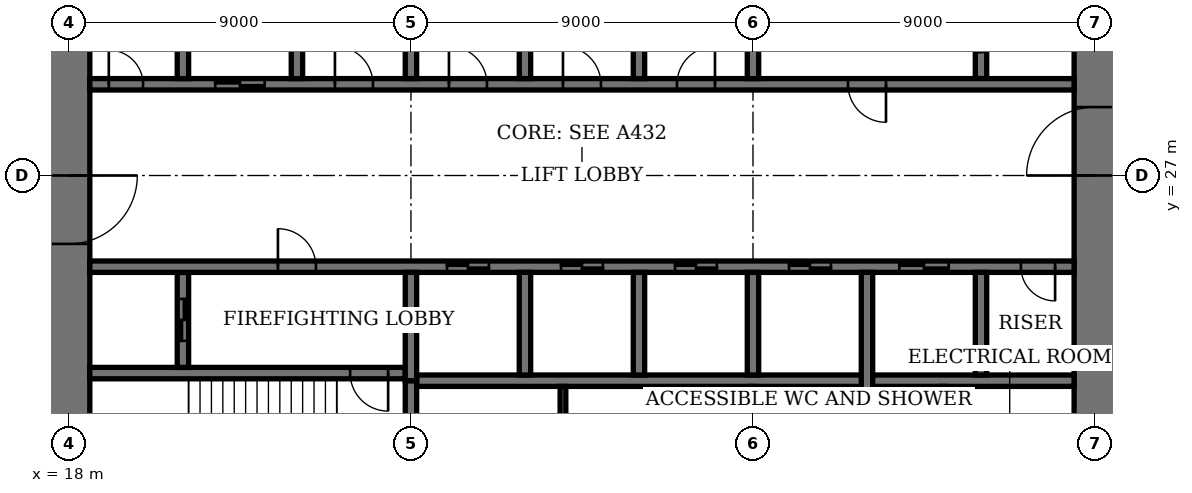
"""IFC4 building model, lengths in metres.
Left out: names, types, materials, properties, quantities, classifications, styles, units other than length and angle.
Written with IfcOpenShell. Run it as: python <this file> out.ifc"""

import sys

from ifc_helpers import new_model, si_unit, direction, frame, frame_2d, origin, place, context, subcontext, project, spatial, rectangle, extrude, element, fill, save


model = new_model("IFC4")
c1 = context("Model", 3, precision=1e-05, world=origin(), true_north=direction((0.0, 1.0)))
c2 = subcontext(c1, "Body", "Model", "MODEL_VIEW")
j1 = project(units=[si_unit("LENGTHUNIT", "METRE"), si_unit("PLANEANGLEUNIT", "RADIAN")], contexts=[c1])
p1 = place(None, origin())
s1 = spatial("IfcSite", under=j1, at=p1, CompositionType="ELEMENT")
p2 = place(p1, origin())
s2 = spatial("IfcBuilding", under=s1, at=p2, CompositionType="ELEMENT")
p3 = place(p2, frame((0.0, 0.0, 291.4)))
s3 = spatial("IfcBuildingStorey", under=s2, at=p3, CompositionType="ELEMENT", Elevation=291.4)
p4 = place(p3, frame((18.0, 35.45, 0.0), z_axis=(0.0, 0.0, 1.0), x_axis=(0.0, -1.0, 0.0)))
e1 = element("IfcWall", 1, at=p4, inside=s3, PredefinedType="SHEAR", context=c2, shape_type="SweptSolid", body=[
    extrude(rectangle(XDim=16.9, YDim=1.1, at=frame_2d((8.45, 0.0))), origin(), (0.0, 0.0, 1.0), 4.0),
])
p5 = place(p4, frame((8.45, 0.0, 0.0)))
e2 = element("IfcOpeningElement", 2, at=p5, cuts=e1, PredefinedType="OPENING", context=c2, shape_type="SweptSolid", body=[
    extrude(rectangle(XDim=1.8, YDim=2.4, at=frame_2d((0.9, 1.2))), frame((0.0, 0.56, 0.0), z_axis=(0.0, -1.0, 0.0), x_axis=(1.0, 0.0, 0.0)), (0.0, 0.0, 1.0), 1.12),
])
p6 = place(p3, frame((45.0, 18.55, 0.0), z_axis=(0.0, 0.0, 1.0), x_axis=(0.0, 1.0, 0.0)))
e3 = element("IfcWall", 3, at=p6, inside=s3, PredefinedType="SHEAR", context=c2, shape_type="SweptSolid", body=[
    extrude(rectangle(XDim=16.9, YDim=1.1, at=frame_2d((8.45, 0.0))), origin(), (0.0, 0.0, 1.0), 4.0),
])
p7 = place(p6, frame((8.45, 0.0, 0.0)))
e4 = element("IfcOpeningElement", 4, at=p7, cuts=e3, PredefinedType="OPENING", context=c2, shape_type="SweptSolid", body=[
    extrude(rectangle(XDim=1.8, YDim=2.4, at=frame_2d((0.9, 1.2))), frame((0.0, 0.56, 0.0), z_axis=(0.0, -1.0, 0.0), x_axis=(1.0, 0.0, 0.0)), (0.0, 0.0, 1.0), 1.12),
])
p8 = place(p3, frame((18.55, 21.8, 0.0), z_axis=(0.0, 0.0, 1.0), x_axis=(1.0, 0.0, 0.0)))
e5 = element("IfcWall", 5, at=p8, inside=s3, PredefinedType="SHEAR", context=c2, shape_type="SweptSolid", body=[
    extrude(rectangle(XDim=8.3, YDim=0.3, at=frame_2d((4.15, 0.0))), origin(), (0.0, 0.0, 1.0), 4.0),
])
p9 = place(p8, frame((6.85, 0.0, 0.0)))
e6 = element("IfcOpeningElement", 6, at=p9, cuts=e5, PredefinedType="OPENING", context=c2, shape_type="SweptSolid", body=[
    extrude(rectangle(XDim=1.0, YDim=2.4, at=frame_2d((0.5, 1.2))), frame((0.0, 0.16, 0.0), z_axis=(0.0, -1.0, 0.0), x_axis=(1.0, 0.0, 0.0)), (0.0, 0.0, 1.0), 0.32),
])
p10 = place(p3, frame((27.0, 18.55, 0.0), z_axis=(0.0, 0.0, 1.0), x_axis=(0.0, 1.0, 0.0)))
e7 = element("IfcWall", 7, at=p10, inside=s3, PredefinedType="SHEAR", context=c2, shape_type="SweptSolid", body=[
    extrude(rectangle(XDim=3.05, YDim=0.3, at=frame_2d((1.525, 0.0))), origin(), (0.0, 0.0, 1.0), 4.0),
])
p11 = place(p3, frame((21.0, 21.95, 0.0), z_axis=(0.0, 0.0, 1.0), x_axis=(0.0, 1.0, 0.0)))
e8 = element("IfcWall", 8, at=p11, inside=s3, PredefinedType="SHEAR", context=c2, shape_type="SweptSolid", body=[
    extrude(rectangle(XDim=2.5, YDim=0.3, at=frame_2d((1.25, 0.0))), origin(), (0.0, 0.0, 1.0), 4.0),
])
p12 = place(p11, frame((0.7, 0.0, 0.0)))
e9 = element("IfcOpeningElement", 9, at=p12, cuts=e8, PredefinedType="OPENING", context=c2, shape_type="SweptSolid", body=[
    extrude(rectangle(XDim=1.1, YDim=2.4, at=frame_2d((0.55, 1.2))), frame((0.0, 0.16, 0.0), z_axis=(0.0, -1.0, 0.0), x_axis=(1.0, 0.0, 0.0)), (0.0, 0.0, 1.0), 0.32),
])
p13 = place(p3, frame((42.0, 29.55, 0.0), z_axis=(0.0, 0.0, 1.0), x_axis=(0.0, 1.0, 0.0)))
e10 = element("IfcWall", 10, at=p13, inside=s3, PredefinedType="SHEAR", context=c2, shape_type="SweptSolid", body=[
    extrude(rectangle(XDim=2.5, YDim=0.3, at=frame_2d((1.25, 0.0))), origin(), (0.0, 0.0, 1.0), 4.0),
])
p14 = place(p13, frame((0.7, 0.0, 0.0)))
e11 = element("IfcOpeningElement", 11, at=p14, cuts=e10, PredefinedType="OPENING", context=c2, shape_type="SweptSolid", body=[
    extrude(rectangle(XDim=1.1, YDim=2.4, at=frame_2d((0.55, 1.2))), frame((0.0, 0.16, 0.0), z_axis=(0.0, -1.0, 0.0), x_axis=(1.0, 0.0, 0.0)), (0.0, 0.0, 1.0), 0.32),
])
p15 = place(p3, frame((18.55, 24.6, 0.0), z_axis=(0.0, 0.0, 1.0), x_axis=(1.0, 0.0, 0.0)))
e12 = element("IfcWall", 12, at=p15, inside=s3, PredefinedType="SHEAR", context=c2, shape_type="SweptSolid", body=[
    extrude(rectangle(XDim=25.9, YDim=0.3, at=frame_2d((12.95, 0.0))), origin(), (0.0, 0.0, 1.0), 4.0),
])
p16 = place(p15, frame((4.95, 0.0, 0.0)))
e13 = element("IfcOpeningElement", 13, at=p16, cuts=e12, PredefinedType="OPENING", context=c2, shape_type="SweptSolid", body=[
    extrude(rectangle(XDim=1.0, YDim=2.4, at=frame_2d((0.5, 1.2))), frame((0.0, 0.16, 0.0), z_axis=(0.0, -1.0, 0.0), x_axis=(1.0, 0.0, 0.0)), (0.0, 0.0, 1.0), 0.32),
])
p17 = place(p15, frame((24.5, 0.0, 0.0)))
e14 = element("IfcOpeningElement", 14, at=p17, cuts=e12, PredefinedType="OPENING", context=c2, shape_type="SweptSolid", body=[
    extrude(rectangle(XDim=0.9, YDim=2.1, at=frame_2d((0.45, 1.05))), frame((0.0, 0.16, 0.0), z_axis=(0.0, -1.0, 0.0), x_axis=(1.0, 0.0, 0.0)), (0.0, 0.0, 1.0), 0.32),
])
p18 = place(p15, frame((9.4, 0.0, 0.0)))
e15 = element("IfcOpeningElement", 15, at=p18, cuts=e12, PredefinedType="OPENING", context=c2, shape_type="SweptSolid", body=[
    extrude(rectangle(XDim=1.1, YDim=2.4, at=frame_2d((0.55, 1.2))), frame((0.0, 0.16, 0.0), z_axis=(0.0, -1.0, 0.0), x_axis=(1.0, 0.0, 0.0)), (0.0, 0.0, 1.0), 0.32),
])
p19 = place(p15, frame((12.4, 0.0, 0.0)))
e16 = element("IfcOpeningElement", 16, at=p19, cuts=e12, PredefinedType="OPENING", context=c2, shape_type="SweptSolid", body=[
    extrude(rectangle(XDim=1.1, YDim=2.4, at=frame_2d((0.55, 1.2))), frame((0.0, 0.16, 0.0), z_axis=(0.0, -1.0, 0.0), x_axis=(1.0, 0.0, 0.0)), (0.0, 0.0, 1.0), 0.32),
])
p20 = place(p15, frame((15.4, 0.0, 0.0)))
e17 = element("IfcOpeningElement", 17, at=p20, cuts=e12, PredefinedType="OPENING", context=c2, shape_type="SweptSolid", body=[
    extrude(rectangle(XDim=1.1, YDim=2.4, at=frame_2d((0.55, 1.2))), frame((0.0, 0.16, 0.0), z_axis=(0.0, -1.0, 0.0), x_axis=(1.0, 0.0, 0.0)), (0.0, 0.0, 1.0), 0.32),
])
p21 = place(p15, frame((18.4, 0.0, 0.0)))
e18 = element("IfcOpeningElement", 18, at=p21, cuts=e12, PredefinedType="OPENING", context=c2, shape_type="SweptSolid", body=[
    extrude(rectangle(XDim=1.1, YDim=2.4, at=frame_2d((0.55, 1.2))), frame((0.0, 0.16, 0.0), z_axis=(0.0, -1.0, 0.0), x_axis=(1.0, 0.0, 0.0)), (0.0, 0.0, 1.0), 0.32),
])
p22 = place(p15, frame((21.3, 0.0, 0.0)))
e19 = element("IfcOpeningElement", 19, at=p22, cuts=e12, PredefinedType="OPENING", context=c2, shape_type="SweptSolid", body=[
    extrude(rectangle(XDim=1.3, YDim=2.4, at=frame_2d((0.65, 1.2))), frame((0.0, 0.16, 0.0), z_axis=(0.0, -1.0, 0.0), x_axis=(1.0, 0.0, 0.0)), (0.0, 0.0, 1.0), 0.32),
])
p23 = place(p3, frame((18.55, 29.4, 0.0), z_axis=(0.0, 0.0, 1.0), x_axis=(1.0, 0.0, 0.0)))
e20 = element("IfcWall", 20, at=p23, inside=s3, PredefinedType="SHEAR", context=c2, shape_type="SweptSolid", body=[
    extrude(rectangle(XDim=25.9, YDim=0.3, at=frame_2d((12.95, 0.0))), origin(), (0.0, 0.0, 1.0), 4.0),
])
p24 = place(p23, frame((19.95, 0.0, 0.0)))
e21 = element("IfcOpeningElement", 21, at=p24, cuts=e20, PredefinedType="OPENING", context=c2, shape_type="SweptSolid", body=[
    extrude(rectangle(XDim=1.0, YDim=2.4, at=frame_2d((0.5, 1.2))), frame((0.0, 0.16, 0.0), z_axis=(0.0, -1.0, 0.0), x_axis=(1.0, 0.0, 0.0)), (0.0, 0.0, 1.0), 0.32),
])
p25 = place(p23, frame((0.5, 0.0, 0.0)))
e22 = element("IfcOpeningElement", 22, at=p25, cuts=e20, PredefinedType="OPENING", context=c2, shape_type="SweptSolid", body=[
    extrude(rectangle(XDim=0.9, YDim=2.1, at=frame_2d((0.45, 1.05))), frame((0.0, 0.16, 0.0), z_axis=(0.0, -1.0, 0.0), x_axis=(1.0, 0.0, 0.0)), (0.0, 0.0, 1.0), 0.32),
])
p26 = place(p23, frame((15.45, 0.0, 0.0)))
e23 = element("IfcOpeningElement", 23, at=p26, cuts=e20, PredefinedType="OPENING", context=c2, shape_type="SweptSolid", body=[
    extrude(rectangle(XDim=1.0, YDim=2.4, at=frame_2d((0.5, 1.2))), frame((0.0, 0.16, 0.0), z_axis=(0.0, -1.0, 0.0), x_axis=(1.0, 0.0, 0.0)), (0.0, 0.0, 1.0), 0.32),
])
p27 = place(p23, frame((12.45, 0.0, 0.0)))
e24 = element("IfcOpeningElement", 24, at=p27, cuts=e20, PredefinedType="OPENING", context=c2, shape_type="SweptSolid", body=[
    extrude(rectangle(XDim=1.0, YDim=2.4, at=frame_2d((0.5, 1.2))), frame((0.0, 0.16, 0.0), z_axis=(0.0, -1.0, 0.0), x_axis=(1.0, 0.0, 0.0)), (0.0, 0.0, 1.0), 0.32),
])
p28 = place(p23, frame((9.45, 0.0, 0.0)))
e25 = element("IfcOpeningElement", 25, at=p28, cuts=e20, PredefinedType="OPENING", context=c2, shape_type="SweptSolid", body=[
    extrude(rectangle(XDim=1.0, YDim=2.4, at=frame_2d((0.5, 1.2))), frame((0.0, 0.16, 0.0), z_axis=(0.0, -1.0, 0.0), x_axis=(1.0, 0.0, 0.0)), (0.0, 0.0, 1.0), 0.32),
])
p29 = place(p23, frame((6.45, 0.0, 0.0)))
e26 = element("IfcOpeningElement", 26, at=p29, cuts=e20, PredefinedType="OPENING", context=c2, shape_type="SweptSolid", body=[
    extrude(rectangle(XDim=1.0, YDim=2.4, at=frame_2d((0.5, 1.2))), frame((0.0, 0.16, 0.0), z_axis=(0.0, -1.0, 0.0), x_axis=(1.0, 0.0, 0.0)), (0.0, 0.0, 1.0), 0.32),
])
p30 = place(p23, frame((3.3, 0.0, 0.0)))
e27 = element("IfcOpeningElement", 27, at=p30, cuts=e20, PredefinedType="OPENING", context=c2, shape_type="SweptSolid", body=[
    extrude(rectangle(XDim=1.3, YDim=2.4, at=frame_2d((0.65, 1.2))), frame((0.0, 0.16, 0.0), z_axis=(0.0, -1.0, 0.0), x_axis=(1.0, 0.0, 0.0)), (0.0, 0.0, 1.0), 0.32),
])
p31 = place(p3, frame((27.15, 21.6, 0.0), z_axis=(0.0, 0.0, 1.0), x_axis=(1.0, 0.0, 0.0)))
e28 = element("IfcWall", 28, at=p31, inside=s3, PredefinedType="SHEAR", context=c2, shape_type="SweptSolid", body=[
    extrude(rectangle(XDim=17.3, YDim=0.3, at=frame_2d((8.65, 0.0))), origin(), (0.0, 0.0, 1.0), 4.0),
])
for number, where, z_axis, x_axis in (
    (29, (30.0, 21.75, 0.0), (0.0, 0.0, 1.0), (0.0, 1.0, 0.0)),
    (30, (33.0, 29.55, 0.0), (0.0, 0.0, 1.0), (0.0, 1.0, 0.0)),
    (31, (33.0, 21.75, 0.0), (0.0, 0.0, 1.0), (0.0, 1.0, 0.0)),
    (32, (30.0, 29.55, 0.0), (0.0, 0.0, 1.0), (0.0, 1.0, 0.0)),
    (33, (36.0, 21.75, 0.0), (0.0, 0.0, 1.0), (0.0, 1.0, 0.0)),
    (34, (27.0, 29.55, 0.0), (0.0, 0.0, 1.0), (0.0, 1.0, 0.0)),
):
    element("IfcWall", number, at=place(p3, frame(where, z_axis=z_axis, x_axis=x_axis)), inside=s3, PredefinedType="SHEAR", context=c2, shape_type="SweptSolid", body=[
        extrude(rectangle(XDim=2.7, YDim=0.3, at=frame_2d((1.35, 0.0))), origin(), (0.0, 0.0, 1.0), 4.0),
    ])
for number, where, z_axis, x_axis in (
    (35, (39.0, 18.55, 0.0), (0.0, 0.0, 1.0), (0.0, 1.0, 0.0)),
    (36, (24.0, 29.55, 0.0), (0.0, 0.0, 1.0), (0.0, 1.0, 0.0)),
):
    element("IfcWall", number, at=place(p3, frame(where, z_axis=z_axis, x_axis=x_axis)), inside=s3, PredefinedType="SHEAR", context=c2, shape_type="SweptSolid", body=[
        extrude(rectangle(XDim=5.9, YDim=0.3, at=frame_2d((2.95, 0.0))), origin(), (0.0, 0.0, 1.0), 4.0),
    ])
for number, where, z_axis, x_axis in (
    (37, (42.0, 21.75, 0.0), (0.0, 0.0, 1.0), (0.0, 1.0, 0.0)),
    (38, (21.0, 29.55, 0.0), (0.0, 0.0, 1.0), (0.0, 1.0, 0.0)),
):
    element("IfcWall", number, at=place(p3, frame(where, z_axis=z_axis, x_axis=x_axis)), inside=s3, PredefinedType="SHEAR", context=c2, shape_type="SweptSolid", body=[
        extrude(rectangle(XDim=2.7, YDim=0.3, at=frame_2d((1.35, 0.0))), origin(), (0.0, 0.0, 1.0), 4.0),
    ])
for number, where, z_axis, x_axis in (
    (39, (27.0, 21.6, 0.0), (0.0, 0.0, 1.0), (0.0, 1.0, 0.0)),
    (40, (36.0, 29.55, 0.0), (0.0, 0.0, 1.0), (0.0, 1.0, 0.0)),
):
    element("IfcWall", number, at=place(p3, frame(where, z_axis=z_axis, x_axis=x_axis)), inside=s3, PredefinedType="SHEAR", context=c2, shape_type="SweptSolid", body=[
        extrude(rectangle(XDim=2.85, YDim=0.3, at=frame_2d((1.425, 0.0))), origin(), (0.0, 0.0, 1.0), 4.0),
    ])
for number, where, z_axis, x_axis in (
    (41, (31.0, 18.55, 0.0), (0.0, 0.0, 1.0), (0.0, 1.0, 0.0)),
    (42, (36.0, 18.55, 0.0), (0.0, 0.0, 1.0), (0.0, 1.0, 0.0)),
):
    element("IfcWall", number, at=place(p3, frame(where, z_axis=z_axis, x_axis=x_axis)), inside=s3, PredefinedType="PARTITIONING", context=c2, shape_type="SweptSolid", body=[
        extrude(rectangle(XDim=2.9, YDim=0.15, at=frame_2d((1.45, 0.0))), origin(), (0.0, 0.0, 1.0), 3.75),
    ])
p32 = place(p3, frame((41.0, 18.55, 0.0), z_axis=(0.0, 0.0, 1.0), x_axis=(0.0, 1.0, 0.0)))
e43 = element("IfcWall", 43, at=p32, inside=s3, PredefinedType="PARTITIONING", context=c2, shape_type="SweptSolid", body=[
    extrude(rectangle(XDim=2.9, YDim=0.12, at=frame_2d((1.45, 0.0))), origin(), (0.0, 0.0, 1.0), 3.75),
])
p33 = place(p32, frame((0.95, 0.0, 0.0)))
e44 = element("IfcOpeningElement", 44, at=p33, cuts=e43, PredefinedType="OPENING", context=c2, shape_type="SweptSolid", body=[
    extrude(rectangle(XDim=1.0, YDim=2.4, at=frame_2d((0.5, 1.2))), frame((0.0, 0.07, 0.0), z_axis=(0.0, -1.0, 0.0), x_axis=(1.0, 0.0, 0.0)), (0.0, 0.0, 1.0), 0.14),
])
p34 = place(p5, origin())
e45 = element("IfcDoor", 45, at=p34, inside=s3, OperationType="DOUBLE_DOOR_DOUBLE_SWING", PredefinedType="DOOR", context=c2, shape_type="SweptSolid", body=[
    extrude(rectangle(XDim=1.8, YDim=2.4, at=frame_2d((0.9, 1.2))), frame((0.0, 0.03, 0.0), z_axis=(0.0, -1.0, 0.0), x_axis=(1.0, 0.0, 0.0)), (0.0, 0.0, 1.0), 0.06),
    extrude(rectangle(XDim=0.04, YDim=2.4, at=frame_2d((0.02, 1.2))), frame((0.0, 0.55, 0.0), z_axis=(0.0, -1.0, 0.0), x_axis=(1.0, 0.0, 0.0)), (0.0, 0.0, 1.0), 1.1),
    extrude(rectangle(XDim=0.04, YDim=2.4, at=frame_2d((1.78, 1.2))), frame((0.0, 0.55, 0.0), z_axis=(0.0, -1.0, 0.0), x_axis=(1.0, 0.0, 0.0)), (0.0, 0.0, 1.0), 1.1),
    extrude(rectangle(XDim=1.8, YDim=0.04, at=frame_2d((0.9, 2.38))), frame((0.0, 0.55, 0.0), z_axis=(0.0, -1.0, 0.0), x_axis=(1.0, 0.0, 0.0)), (0.0, 0.0, 1.0), 1.1),
])
fill(e2, e45)
p35 = place(p7, origin())
e46 = element("IfcDoor", 46, at=p35, inside=s3, OperationType="DOUBLE_DOOR_DOUBLE_SWING", PredefinedType="DOOR", context=c2, shape_type="SweptSolid", body=[
    extrude(rectangle(XDim=1.8, YDim=2.4, at=frame_2d((0.9, 1.2))), frame((0.0, 0.03, 0.0), z_axis=(0.0, -1.0, 0.0), x_axis=(1.0, 0.0, 0.0)), (0.0, 0.0, 1.0), 0.06),
    extrude(rectangle(XDim=0.04, YDim=2.4, at=frame_2d((0.02, 1.2))), frame((0.0, 0.55, 0.0), z_axis=(0.0, -1.0, 0.0), x_axis=(1.0, 0.0, 0.0)), (0.0, 0.0, 1.0), 1.1),
    extrude(rectangle(XDim=0.04, YDim=2.4, at=frame_2d((1.78, 1.2))), frame((0.0, 0.55, 0.0), z_axis=(0.0, -1.0, 0.0), x_axis=(1.0, 0.0, 0.0)), (0.0, 0.0, 1.0), 1.1),
    extrude(rectangle(XDim=1.8, YDim=0.04, at=frame_2d((0.9, 2.38))), frame((0.0, 0.55, 0.0), z_axis=(0.0, -1.0, 0.0), x_axis=(1.0, 0.0, 0.0)), (0.0, 0.0, 1.0), 1.1),
])
fill(e4, e46)
p36 = place(p9, origin())
e47 = element("IfcDoor", 47, at=p36, inside=s3, OperationType="SINGLE_SWING_RIGHT", PredefinedType="DOOR", context=c2, shape_type="SweptSolid", body=[
    extrude(rectangle(XDim=1.0, YDim=2.4, at=frame_2d((0.5, 1.2))), frame((0.0, 0.03, 0.0), z_axis=(0.0, -1.0, 0.0), x_axis=(1.0, 0.0, 0.0)), (0.0, 0.0, 1.0), 0.06),
])
fill(e6, e47)
p37 = place(p16, origin())
e48 = element("IfcDoor", 48, at=p37, inside=s3, OperationType="SINGLE_SWING_RIGHT", PredefinedType="DOOR", context=c2, shape_type="SweptSolid", body=[
    extrude(rectangle(XDim=1.0, YDim=2.4, at=frame_2d((0.5, 1.2))), frame((0.0, 0.03, 0.0), z_axis=(0.0, -1.0, 0.0), x_axis=(1.0, 0.0, 0.0)), (0.0, 0.0, 1.0), 0.06),
])
fill(e13, e48)
p38 = place(p24, origin())
e49 = element("IfcDoor", 49, at=p38, inside=s3, OperationType="SINGLE_SWING_RIGHT", PredefinedType="DOOR", context=c2, shape_type="SweptSolid", body=[
    extrude(rectangle(XDim=1.0, YDim=2.4, at=frame_2d((0.5, 1.2))), frame((0.0, 0.03, 0.0), z_axis=(0.0, -1.0, 0.0), x_axis=(1.0, 0.0, 0.0)), (0.0, 0.0, 1.0), 0.06),
])
fill(e21, e49)
p39 = place(p17, origin())
e50 = element("IfcDoor", 50, at=p39, inside=s3, OperationType="SINGLE_SWING_RIGHT", PredefinedType="DOOR", context=c2, shape_type="SweptSolid", body=[
    extrude(rectangle(XDim=0.9, YDim=2.1, at=frame_2d((0.45, 1.05))), frame((0.0, 0.03, 0.0), z_axis=(0.0, -1.0, 0.0), x_axis=(1.0, 0.0, 0.0)), (0.0, 0.0, 1.0), 0.06),
])
fill(e14, e50)
p40 = place(p25, origin())
e51 = element("IfcDoor", 51, at=p40, inside=s3, OperationType="SINGLE_SWING_RIGHT", PredefinedType="DOOR", context=c2, shape_type="SweptSolid", body=[
    extrude(rectangle(XDim=0.9, YDim=2.1, at=frame_2d((0.45, 1.05))), frame((0.0, 0.03, 0.0), z_axis=(0.0, -1.0, 0.0), x_axis=(1.0, 0.0, 0.0)), (0.0, 0.0, 1.0), 0.06),
])
fill(e22, e51)
p41 = place(p18, origin())
e52 = element("IfcDoor", 52, at=p41, inside=s3, OperationType="DOUBLE_DOOR_SLIDING", PredefinedType="DOOR", context=c2, shape_type="SweptSolid", body=[
    extrude(rectangle(XDim=1.1, YDim=2.4, at=frame_2d((0.55, 1.2))), frame((0.0, 0.02, 0.0), z_axis=(0.0, -1.0, 0.0), x_axis=(1.0, 0.0, 0.0)), (0.0, 0.0, 1.0), 0.04),
])
fill(e15, e52)
p42 = place(p19, origin())
e53 = element("IfcDoor", 53, at=p42, inside=s3, OperationType="DOUBLE_DOOR_SLIDING", PredefinedType="DOOR", context=c2, shape_type="SweptSolid", body=[
    extrude(rectangle(XDim=1.1, YDim=2.4, at=frame_2d((0.55, 1.2))), frame((0.0, 0.02, 0.0), z_axis=(0.0, -1.0, 0.0), x_axis=(1.0, 0.0, 0.0)), (0.0, 0.0, 1.0), 0.04),
])
fill(e16, e53)
p43 = place(p20, origin())
e54 = element("IfcDoor", 54, at=p43, inside=s3, OperationType="DOUBLE_DOOR_SLIDING", PredefinedType="DOOR", context=c2, shape_type="SweptSolid", body=[
    extrude(rectangle(XDim=1.1, YDim=2.4, at=frame_2d((0.55, 1.2))), frame((0.0, 0.02, 0.0), z_axis=(0.0, -1.0, 0.0), x_axis=(1.0, 0.0, 0.0)), (0.0, 0.0, 1.0), 0.04),
])
fill(e17, e54)
p44 = place(p21, origin())
e55 = element("IfcDoor", 55, at=p44, inside=s3, OperationType="DOUBLE_DOOR_SLIDING", PredefinedType="DOOR", context=c2, shape_type="SweptSolid", body=[
    extrude(rectangle(XDim=1.1, YDim=2.4, at=frame_2d((0.55, 1.2))), frame((0.0, 0.02, 0.0), z_axis=(0.0, -1.0, 0.0), x_axis=(1.0, 0.0, 0.0)), (0.0, 0.0, 1.0), 0.04),
])
fill(e18, e55)
p45 = place(p26, origin())
e56 = element("IfcDoor", 56, at=p45, inside=s3, OperationType="SINGLE_SWING_LEFT", PredefinedType="DOOR", context=c2, shape_type="SweptSolid", body=[
    extrude(rectangle(XDim=1.0, YDim=2.4, at=frame_2d((0.5, 1.2))), frame((0.0, 0.03, 0.0), z_axis=(0.0, -1.0, 0.0), x_axis=(1.0, 0.0, 0.0)), (0.0, 0.0, 1.0), 0.06),
])
fill(e23, e56)
p46 = place(p27, origin())
e57 = element("IfcDoor", 57, at=p46, inside=s3, OperationType="SINGLE_SWING_RIGHT", PredefinedType="DOOR", context=c2, shape_type="SweptSolid", body=[
    extrude(rectangle(XDim=1.0, YDim=2.4, at=frame_2d((0.5, 1.2))), frame((0.0, 0.03, 0.0), z_axis=(0.0, -1.0, 0.0), x_axis=(1.0, 0.0, 0.0)), (0.0, 0.0, 1.0), 0.06),
])
fill(e24, e57)
p47 = place(p28, origin())
e58 = element("IfcDoor", 58, at=p47, inside=s3, OperationType="SINGLE_SWING_RIGHT", PredefinedType="DOOR", context=c2, shape_type="SweptSolid", body=[
    extrude(rectangle(XDim=1.0, YDim=2.4, at=frame_2d((0.5, 1.2))), frame((0.0, 0.03, 0.0), z_axis=(0.0, -1.0, 0.0), x_axis=(1.0, 0.0, 0.0)), (0.0, 0.0, 1.0), 0.06),
])
fill(e25, e58)
p48 = place(p29, origin())
e59 = element("IfcDoor", 59, at=p48, inside=s3, OperationType="SINGLE_SWING_RIGHT", PredefinedType="DOOR", context=c2, shape_type="SweptSolid", body=[
    extrude(rectangle(XDim=1.0, YDim=2.4, at=frame_2d((0.5, 1.2))), frame((0.0, 0.03, 0.0), z_axis=(0.0, -1.0, 0.0), x_axis=(1.0, 0.0, 0.0)), (0.0, 0.0, 1.0), 0.06),
])
fill(e26, e59)
p49 = place(p22, origin())
e60 = element("IfcDoor", 60, at=p49, inside=s3, OperationType="DOUBLE_DOOR_SLIDING", PredefinedType="DOOR", context=c2, shape_type="SweptSolid", body=[
    extrude(rectangle(XDim=1.3, YDim=2.4, at=frame_2d((0.65, 1.2))), frame((0.0, 0.02, 0.0), z_axis=(0.0, -1.0, 0.0), x_axis=(1.0, 0.0, 0.0)), (0.0, 0.0, 1.0), 0.04),
])
fill(e19, e60)
p50 = place(p30, origin())
e61 = element("IfcDoor", 61, at=p50, inside=s3, OperationType="DOUBLE_DOOR_SLIDING", PredefinedType="DOOR", context=c2, shape_type="SweptSolid", body=[
    extrude(rectangle(XDim=1.3, YDim=2.4, at=frame_2d((0.65, 1.2))), frame((0.0, 0.02, 0.0), z_axis=(0.0, -1.0, 0.0), x_axis=(1.0, 0.0, 0.0)), (0.0, 0.0, 1.0), 0.04),
])
fill(e27, e61)
p51 = place(p12, origin())
e62 = element("IfcDoor", 62, at=p51, inside=s3, OperationType="DOUBLE_DOOR_SLIDING", PredefinedType="DOOR", context=c2, shape_type="SweptSolid", body=[
    extrude(rectangle(XDim=1.1, YDim=2.4, at=frame_2d((0.55, 1.2))), frame((0.0, 0.03, 0.0), z_axis=(0.0, -1.0, 0.0), x_axis=(1.0, 0.0, 0.0)), (0.0, 0.0, 1.0), 0.06),
])
fill(e9, e62)
save(model, sys.argv[1])
